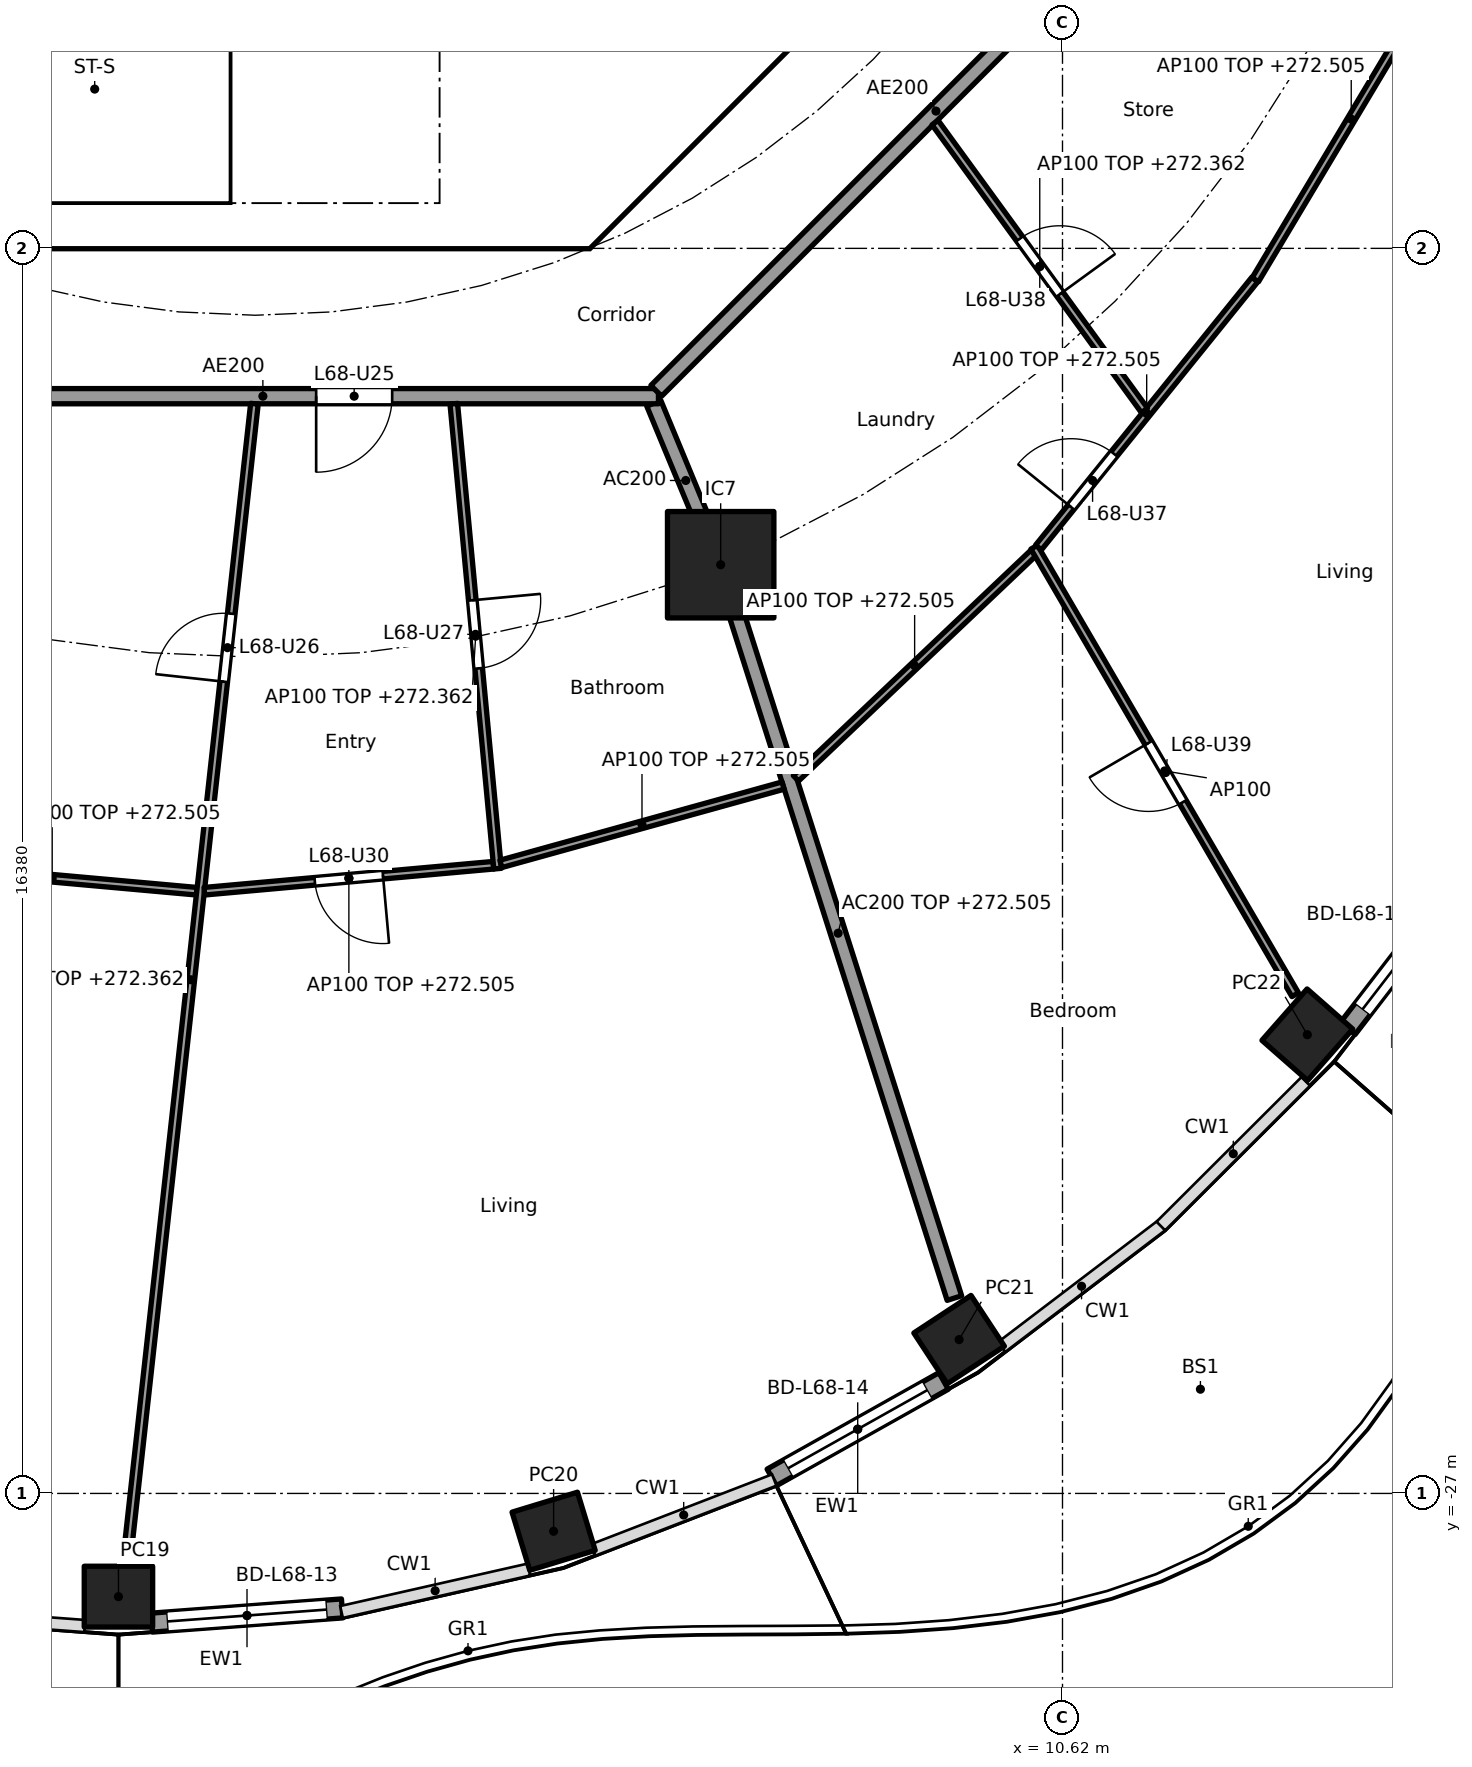
"""IFC4 building model, lengths in metres.
Left out: names, types, materials, properties, quantities, classifications, styles, units other than length and angle.
Written with IfcOpenShell. Run it as: python <this file> out.ifc"""

import sys

from ifc_helpers import new_model, si_unit, direction, frame, frame_2d, origin, origin_2d, place, context, subcontext, project, spatial, polyline, rectangle, hollow_rectangle, outline, extrude, element, fill, save


model = new_model("IFC4")
c1 = context("Model", 3, precision=1e-05, world=origin(), true_north=direction((0.0, 1.0)))
c2 = subcontext(c1, "Body", "Model", "MODEL_VIEW")
j1 = project(units=[si_unit("LENGTHUNIT", "METRE"), si_unit("PLANEANGLEUNIT", "RADIAN")], contexts=[c1])
p1 = place(None, origin())
s1 = spatial("IfcSite", under=j1, at=p1, CompositionType="ELEMENT")
p2 = place(p1, origin())
s2 = spatial("IfcBuilding", under=s1, at=p2, CompositionType="ELEMENT")
p3 = place(p2, frame((0.0, 0.0, 269.6)))
s3 = spatial("IfcBuildingStorey", under=s2, at=p3, CompositionType="ELEMENT", Elevation=269.6)
for number, where, z_axis, x_axis in (
    (1, (-1.8, -28.358, 0.0), (0.0, 0.0, 1.0), (1.0, 0.0, 0.0)),
    (2, (3.925, -27.498, 0.0), (0.0, 0.0, 1.0), (0.957, 0.292, 0.0)),
    (3, (9.26, -24.976, 0.0), (0.0, 0.0, 1.0), (0.836, 0.549, 0.0)),
    (4, (13.841, -20.965, 0.0), (0.0, 0.0, 1.0), (0.66, 0.751, 0.0)),
):
    element("IfcColumn", number, at=place(p3, frame(where, z_axis=z_axis, x_axis=x_axis)), inside=s3, PredefinedType="COLUMN", context=c2, shape_type="SweptSolid", body=[
        extrude(hollow_rectangle(XDim=0.9, YDim=0.8, WallThickness=0.028, at=origin_2d()), origin(), (0.0, 0.0, 1.0), 3.7),
    ])
p4 = place(p3, frame((6.123, -14.782, 0.0), z_axis=(0.0, 0.0, 1.0), x_axis=(1.0, 0.0, 0.0)))
e5 = element("IfcColumn", 5, at=p4, inside=s3, PredefinedType="COLUMN", context=c2, shape_type="SweptSolid", body=[
    extrude(rectangle(XDim=1.4, YDim=1.4, at=origin_2d()), origin(), (0.0, 0.0, 1.0), 3.7),
])
p5 = place(p3, frame((1.143, -28.513, 0.0), z_axis=(0.0, 0.0, 1.0), x_axis=(-0.997236892469, -0.074287147606, 0.0)))
e6 = element("IfcWall", 6, at=p5, inside=s3, PredefinedType="SOLIDWALL", context=c2, shape_type="SweptSolid", body=[
    extrude(rectangle(XDim=2.511, YDim=0.25, at=frame_2d((1.255, 0.0))), origin(), (0.0, 0.0, 1.0), 3.44),
])
p6 = place(p5, frame((0.205, 0.0, 0.0)))
e7 = element("IfcOpeningElement", 7, at=p6, cuts=e6, PredefinedType="OPENING", context=c2, shape_type="SweptSolid", body=[
    extrude(rectangle(XDim=2.1, YDim=2.4, at=frame_2d((1.05, 1.2))), frame((0.0, 0.135, 0.0), z_axis=(0.0, -1.0, 0.0), x_axis=(1.0, 0.0, 0.0)), (0.0, 0.0, 1.0), 0.27),
])
p7 = place(p3, frame((9.056, -25.521, 0.0), z_axis=(0.0, 0.0, 1.0), x_axis=(-0.872093060299, -0.489340059855, 0.0)))
e8 = element("IfcWall", 8, at=p7, inside=s3, PredefinedType="SOLIDWALL", context=c2, shape_type="SweptSolid", body=[
    extrude(rectangle(XDim=2.593, YDim=0.25, at=frame_2d((1.296, 0.0))), origin(), (0.0, 0.0, 1.0), 3.44),
])
p8 = place(p7, frame((0.247, 0.0, 0.0)))
e9 = element("IfcOpeningElement", 9, at=p8, cuts=e8, PredefinedType="OPENING", context=c2, shape_type="SweptSolid", body=[
    extrude(rectangle(XDim=2.1, YDim=2.4, at=frame_2d((1.05, 1.2))), frame((0.0, 0.135, 0.0), z_axis=(0.0, -1.0, 0.0), x_axis=(1.0, 0.0, 0.0)), (0.0, 0.0, 1.0), 0.27),
])
p9 = place(p3, frame((16.047, -18.711, 0.0), z_axis=(0.0, 0.0, 1.0), x_axis=(-0.610432336622, -0.792068407656, 0.0)))
e10 = element("IfcWall", 10, at=p9, inside=s3, PredefinedType="SOLIDWALL", context=c2, shape_type="SweptSolid", body=[
    extrude(rectangle(XDim=2.746, YDim=0.25, at=frame_2d((1.373, 0.0))), origin(), (0.0, 0.0, 1.0), 3.44),
])
p10 = place(p9, frame((0.323, 0.0, 0.0)))
e11 = element("IfcOpeningElement", 11, at=p10, cuts=e10, PredefinedType="OPENING", context=c2, shape_type="SweptSolid", body=[
    extrude(rectangle(XDim=2.1, YDim=2.4, at=frame_2d((1.05, 1.2))), frame((0.0, 0.135, 0.0), z_axis=(0.0, -1.0, 0.0), x_axis=(1.0, 0.0, 0.0)), (0.0, 0.0, 1.0), 0.27),
])
p11 = place(p3, frame((4.613, -9.988, 0.0), z_axis=(0.0, 0.0, 1.0), x_axis=(0.707106781187, 0.707106781187, 0.0)))
e12 = element("IfcWall", 12, at=p11, inside=s3, PredefinedType="SHEAR", context=c2, shape_type="SweptSolid", body=[
    extrude(rectangle(XDim=7.602, YDim=0.6, at=frame_2d((3.801, 0.0))), origin(), (0.0, 0.0, 1.0), 3.44),
])
p12 = place(p11, frame((3.201, 0.0, 0.0)))
e13 = element("IfcOpeningElement", 13, at=p12, cuts=e12, PredefinedType="OPENING", context=c2, shape_type="SweptSolid", body=[
    extrude(rectangle(XDim=1.2, YDim=2.1, at=frame_2d((0.6, 1.05))), frame((0.0, 0.31, 0.0), z_axis=(0.0, -1.0, 0.0), x_axis=(1.0, 0.0, 0.0)), (0.0, 0.0, 1.0), 0.62),
])
p13 = place(p3, frame((4.0, -10.025, 0.0), z_axis=(0.0, 0.0, 1.0), x_axis=(0.0, 1.0, 0.0)))
e14 = element("IfcWall", 14, at=p13, inside=s3, PredefinedType="SOLIDWALL", context=c2, shape_type="SweptSolid", body=[
    extrude(rectangle(XDim=3.0, YDim=0.2, at=frame_2d((1.5, 0.0))), origin(), (0.0, 0.0, 1.0), 3.44),
])
p14 = place(p13, frame((0.975, 0.0, 0.0)))
e15 = element("IfcOpeningElement", 15, at=p14, cuts=e14, PredefinedType="OPENING", context=c2, shape_type="SweptSolid", body=[
    extrude(rectangle(XDim=1.1, YDim=2.1, at=frame_2d((0.55, 1.05))), frame((0.0, 0.11, 0.0), z_axis=(0.0, -1.0, 0.0), x_axis=(1.0, 0.0, 0.0)), (0.0, 0.0, 1.0), 0.22),
])
p15 = place(p3, origin())
e16 = element("IfcWall", 16, at=p15, inside=s3, PredefinedType="SHEAR", context=c2, shape_type="SweptSolid", body=[
    extrude(outline(polyline([(-4.152, -10.025), (4.152, -10.025), (4.401, -9.776), (4.825, -10.2), (4.401, -10.625), (-4.401, -10.625), (-4.825, -10.2), (-4.401, -9.776), (-4.152, -10.025)])), origin(), (0.0, 0.0, 1.0), 3.44),
])
p16 = place(p3, frame((5.243, -12.657, 0.0), z_axis=(0.0, 0.0, 1.0), x_axis=(0.382707856524, -0.923869415315, 0.0)))
e17 = element("IfcWall", 17, at=p16, inside=s3, PredefinedType="PARTITIONING", context=c2, shape_type="SweptSolid", body=[
    extrude(rectangle(XDim=2.2, YDim=0.2, at=frame_2d((1.1, 0.0))), origin(), (0.0, 0.0, 1.0), 3.44),
])
p17 = place(p3, frame((6.138, -14.83, 0.0), z_axis=(0.0, 0.0, 1.0), x_axis=(0.303653679037, -0.952782474234, 0.0)))
e18 = element("IfcWall", 18, at=p17, inside=s3, PredefinedType="PARTITIONING", context=c2, shape_type="SweptSolid", body=[
    extrude(rectangle(XDim=10.076, YDim=0.2, at=frame_2d((5.038, 0.0))), origin(), (0.0, 0.0, 1.0), 2.905),
])
p18 = place(p3, frame((-5.104, -12.565, 0.0), z_axis=(0.0, 0.0, 1.0), x_axis=(1.0, 0.0, 0.0)))
e19 = element("IfcWall", 19, at=p18, inside=s3, PredefinedType="PARTITIONING", context=c2, shape_type="SweptSolid", body=[
    extrude(rectangle(XDim=10.409, YDim=0.2, at=frame_2d((5.205, 0.0))), origin(), (0.0, 0.0, 1.0), 3.44),
])
p19 = place(p18, frame((5.906, 0.0, 0.0)))
e20 = element("IfcOpeningElement", 20, at=p19, cuts=e19, PredefinedType="OPENING", context=c2, shape_type="SweptSolid", body=[
    extrude(rectangle(XDim=1.0, YDim=2.1, at=frame_2d((0.5, 1.05))), frame((0.0, 0.11, 0.0), z_axis=(0.0, -1.0, 0.0), x_axis=(1.0, 0.0, 0.0)), (0.0, 0.0, 1.0), 0.22),
])
p20 = place(p3, frame((5.275, -12.494, 0.0), z_axis=(0.0, 0.0, 1.0), x_axis=(0.707106781187, 0.707106781187, 0.0)))
e21 = element("IfcWall", 21, at=p20, inside=s3, PredefinedType="PARTITIONING", context=c2, shape_type="SweptSolid", body=[
    extrude(rectangle(XDim=10.409, YDim=0.2, at=frame_2d((5.205, 0.0))), origin(), (0.0, 0.0, 1.0), 3.44),
])
p21 = place(p3, frame((-4.573, -18.736, 0.0), z_axis=(0.0, 0.0, 1.0), x_axis=(0.995986472869, -0.089503887414, 0.0)))
e22 = element("IfcWall", 22, at=p21, inside=s3, PredefinedType="PARTITIONING", context=c2, shape_type="SweptSolid", body=[
    extrude(rectangle(XDim=3.819, YDim=0.1, at=frame_2d((1.909, 0.0))), origin(), (0.0, 0.0, 1.0), 2.905),
])
p22 = place(p3, frame((-0.011, -12.664, 0.0), z_axis=(0.0, 0.0, 1.0), x_axis=(-0.109805889692, -0.993953050495, 0.0)))
e23 = element("IfcWall", 23, at=p22, inside=s3, PredefinedType="PARTITIONING", context=c2, shape_type="SweptSolid", body=[
    extrude(rectangle(XDim=15.248, YDim=0.1, at=frame_2d((7.624, 0.0))), origin(), (0.0, 0.0, 1.0), 2.762),
])
p23 = place(p22, frame((2.778, 0.0, 0.0)))
e24 = element("IfcOpeningElement", 24, at=p23, cuts=e23, PredefinedType="OPENING", context=c2, shape_type="SweptSolid", body=[
    extrude(rectangle(XDim=0.9, YDim=2.1, at=frame_2d((0.45, 1.05))), frame((0.0, 0.06, 0.0), z_axis=(0.0, -1.0, 0.0), x_axis=(1.0, 0.0, 0.0)), (0.0, 0.0, 1.0), 0.12),
])
p24 = place(p3, frame((-0.67, -19.077, 0.0), z_axis=(0.0, 0.0, 1.0), x_axis=(0.995986472869, 0.089503887414, 0.0)))
e25 = element("IfcWall", 25, at=p24, inside=s3, PredefinedType="PARTITIONING", context=c2, shape_type="SweptSolid", body=[
    extrude(rectangle(XDim=3.819, YDim=0.1, at=frame_2d((1.909, 0.0))), origin(), (0.0, 0.0, 1.0), 2.905),
])
p25 = place(p24, frame((1.459, 0.0, 0.0)))
e26 = element("IfcOpeningElement", 26, at=p25, cuts=e25, PredefinedType="OPENING", context=c2, shape_type="SweptSolid", body=[
    extrude(rectangle(XDim=0.9, YDim=2.1, at=frame_2d((0.45, 1.05))), frame((0.0, 0.06, 0.0), z_axis=(0.0, -1.0, 0.0), x_axis=(1.0, 0.0, 0.0)), (0.0, 0.0, 1.0), 0.12),
])
p26 = place(p3, frame((2.612, -12.664, 0.0), z_axis=(0.0, 0.0, 1.0), x_axis=(0.093781393779, -0.995592813444, 0.0)))
e27 = element("IfcWall", 27, at=p26, inside=s3, PredefinedType="PARTITIONING", context=c2, shape_type="SweptSolid", body=[
    extrude(rectangle(XDim=6.144, YDim=0.1, at=frame_2d((3.072, 0.0))), origin(), (0.0, 0.0, 1.0), 2.762),
])
p27 = place(p26, frame((2.597, 0.0, 0.0)))
e28 = element("IfcOpeningElement", 28, at=p27, cuts=e27, PredefinedType="OPENING", context=c2, shape_type="SweptSolid", body=[
    extrude(rectangle(XDim=0.9, YDim=2.1, at=frame_2d((0.45, 1.05))), frame((0.0, 0.06, 0.0), z_axis=(0.0, -1.0, 0.0), x_axis=(1.0, 0.0, 0.0)), (0.0, 0.0, 1.0), 0.12),
])
p28 = place(p3, frame((3.231, -18.718, 0.0), z_axis=(0.0, 0.0, 1.0), x_axis=(0.963606817151, 0.267323590318, 0.0)))
e29 = element("IfcWall", 29, at=p28, inside=s3, PredefinedType="PARTITIONING", context=c2, shape_type="SweptSolid", body=[
    extrude(rectangle(XDim=3.853, YDim=0.1, at=frame_2d((1.927, 0.0))), origin(), (0.0, 0.0, 1.0), 2.905),
])
p29 = place(p3, frame((7.113, -17.592, 0.0), z_axis=(0.0, 0.0, 1.0), x_axis=(0.725433932329, 0.688291805723, 0.0)))
e30 = element("IfcWall", 30, at=p29, inside=s3, PredefinedType="PARTITIONING", context=c2, shape_type="SweptSolid", body=[
    extrude(rectangle(XDim=4.305, YDim=0.1, at=frame_2d((2.153, 0.0))), origin(), (0.0, 0.0, 1.0), 2.905),
])
p30 = place(p3, frame((10.248, -14.551, 0.0), z_axis=(0.0, 0.0, 1.0), x_axis=(0.503826483408, -0.86380488226, 0.0)))
e31 = element("IfcWall", 31, at=p30, inside=s3, PredefinedType="PARTITIONING", context=c2, shape_type="SweptSolid", body=[
    extrude(rectangle(XDim=6.816, YDim=0.1, at=frame_2d((3.408, 0.0))), origin(), (0.0, 0.0, 1.0), 3.44),
])
p31 = place(p30, frame((2.983, 0.0, 0.0)))
e32 = element("IfcOpeningElement", 32, at=p31, cuts=e31, PredefinedType="OPENING", context=c2, shape_type="SweptSolid", body=[
    extrude(rectangle(XDim=0.9, YDim=2.1, at=frame_2d((0.45, 1.05))), frame((0.0, 0.06, 0.0), z_axis=(0.0, -1.0, 0.0), x_axis=(1.0, 0.0, 0.0)), (0.0, 0.0, 1.0), 0.12),
])
p32 = place(p3, frame((10.304, -14.555, 0.0), z_axis=(0.0, 0.0, 1.0), x_axis=(0.628170338674, 0.778075848237, 0.0)))
e33 = element("IfcWall", 33, at=p32, inside=s3, PredefinedType="PARTITIONING", context=c2, shape_type="SweptSolid", body=[
    extrude(rectangle(XDim=4.532, YDim=0.1, at=frame_2d((2.266, 0.0))), origin(), (0.0, 0.0, 1.0), 2.905),
])
p33 = place(p32, frame((0.683, 0.0, 0.0)))
e34 = element("IfcOpeningElement", 34, at=p33, cuts=e33, PredefinedType="OPENING", context=c2, shape_type="SweptSolid", body=[
    extrude(rectangle(XDim=0.9, YDim=2.1, at=frame_2d((0.45, 1.05))), frame((0.0, 0.06, 0.0), z_axis=(0.0, -1.0, 0.0), x_axis=(1.0, 0.0, 0.0)), (0.0, 0.0, 1.0), 0.12),
])
p34 = place(p3, frame((8.943, -8.966, 0.0), z_axis=(0.0, 0.0, 1.0), x_axis=(0.588357698232, -0.808600778463, 0.0)))
e35 = element("IfcWall", 35, at=p34, inside=s3, PredefinedType="PARTITIONING", context=c2, shape_type="SweptSolid", body=[
    extrude(rectangle(XDim=4.682, YDim=0.1, at=frame_2d((2.341, 0.0))), origin(), (0.0, 0.0, 1.0), 2.762),
])
p35 = place(p34, frame((1.891, 0.0, 0.0)))
e36 = element("IfcOpeningElement", 36, at=p35, cuts=e35, PredefinedType="OPENING", context=c2, shape_type="SweptSolid", body=[
    extrude(rectangle(XDim=0.9, YDim=2.1, at=frame_2d((0.45, 1.05))), frame((0.0, 0.06, 0.0), z_axis=(0.0, -1.0, 0.0), x_axis=(1.0, 0.0, 0.0)), (0.0, 0.0, 1.0), 0.12),
])
p36 = place(p3, frame((13.157, -11.033, 0.0), z_axis=(0.0, 0.0, 1.0), x_axis=(0.512736548388, 0.858545998737, 0.0)))
e37 = element("IfcWall", 37, at=p36, inside=s3, PredefinedType="PARTITIONING", context=c2, shape_type="SweptSolid", body=[
    extrude(rectangle(XDim=4.922, YDim=0.1, at=frame_2d((2.461, 0.0))), origin(), (0.0, 0.0, 1.0), 2.905),
])
p37 = place(p3, frame((14.823, -6.151, 0.0), z_axis=(0.0, 0.0, 1.0), x_axis=(0.821435065081, -0.570302054928, 0.0)))
e38 = element("IfcWall", 38, at=p37, inside=s3, PredefinedType="PARTITIONING", context=c2, shape_type="SweptSolid", body=[
    extrude(rectangle(XDim=5.368, YDim=0.1, at=frame_2d((2.684, 0.0))), origin(), (0.0, 0.0, 1.0), 3.44),
])
p38 = place(p37, frame((2.771, 0.0, 0.0)))
e39 = element("IfcOpeningElement", 39, at=p38, cuts=e38, PredefinedType="OPENING", context=c2, shape_type="SweptSolid", body=[
    extrude(rectangle(XDim=0.9, YDim=2.1, at=frame_2d((0.45, 1.05))), frame((0.0, 0.06, 0.0), z_axis=(0.0, -1.0, 0.0), x_axis=(1.0, 0.0, 0.0)), (0.0, 0.0, 1.0), 0.12),
])
p39 = place(p6, origin())
e40 = element("IfcDoor", 40, at=p39, inside=s3, OperationType="SLIDING_TO_LEFT", PredefinedType="DOOR", context=c2, shape_type="SweptSolid", body=[
    extrude(rectangle(XDim=2.1, YDim=2.4, at=frame_2d((1.05, 1.2))), frame((0.0, 0.025, 0.0), z_axis=(0.0, -1.0, 0.0), x_axis=(1.0, 0.0, 0.0)), (0.0, 0.0, 1.0), 0.05),
])
fill(e7, e40)
p40 = place(p8, origin())
e41 = element("IfcDoor", 41, at=p40, inside=s3, OperationType="SLIDING_TO_LEFT", PredefinedType="DOOR", context=c2, shape_type="SweptSolid", body=[
    extrude(rectangle(XDim=2.1, YDim=2.4, at=frame_2d((1.05, 1.2))), frame((0.0, 0.025, 0.0), z_axis=(0.0, -1.0, 0.0), x_axis=(1.0, 0.0, 0.0)), (0.0, 0.0, 1.0), 0.05),
])
fill(e9, e41)
p41 = place(p10, origin())
e42 = element("IfcDoor", 42, at=p41, inside=s3, OperationType="SLIDING_TO_LEFT", PredefinedType="DOOR", context=c2, shape_type="SweptSolid", body=[
    extrude(rectangle(XDim=2.1, YDim=2.4, at=frame_2d((1.05, 1.2))), frame((0.0, 0.025, 0.0), z_axis=(0.0, -1.0, 0.0), x_axis=(1.0, 0.0, 0.0)), (0.0, 0.0, 1.0), 0.05),
])
fill(e11, e42)
p42 = place(p14, origin())
e43 = element("IfcDoor", 43, at=p42, inside=s3, OperationType="SINGLE_SWING_LEFT", PredefinedType="DOOR", context=c2, shape_type="SweptSolid", body=[
    extrude(rectangle(XDim=1.1, YDim=2.1, at=frame_2d((0.55, 1.05))), frame((0.0, 0.025, 0.0), z_axis=(0.0, -1.0, 0.0), x_axis=(1.0, 0.0, 0.0)), (0.0, 0.0, 1.0), 0.05),
])
fill(e15, e43)
p43 = place(p19, frame((1.0, 0.0, 0.0), x_axis=(-1.0, 0.0, 0.0)))
e44 = element("IfcDoor", 44, at=p43, inside=s3, OperationType="SINGLE_SWING_RIGHT", PredefinedType="DOOR", context=c2, shape_type="SweptSolid", body=[
    extrude(rectangle(XDim=1.0, YDim=2.1, at=frame_2d((0.5, 1.05))), frame((0.0, 0.025, 0.0), z_axis=(0.0, -1.0, 0.0), x_axis=(1.0, 0.0, 0.0)), (0.0, 0.0, 1.0), 0.05),
])
fill(e20, e44)
p44 = place(p23, frame((0.9, 0.0, 0.0), x_axis=(-1.0, 0.0, 0.0)))
e45 = element("IfcDoor", 45, at=p44, inside=s3, OperationType="SINGLE_SWING_LEFT", PredefinedType="DOOR", context=c2, shape_type="SweptSolid", body=[
    extrude(rectangle(XDim=0.9, YDim=2.1, at=frame_2d((0.45, 1.05))), frame((0.0, 0.025, 0.0), z_axis=(0.0, -1.0, 0.0), x_axis=(1.0, 0.0, 0.0)), (0.0, 0.0, 1.0), 0.05),
])
fill(e24, e45)
p45 = place(p27, origin())
e46 = element("IfcDoor", 46, at=p45, inside=s3, OperationType="SINGLE_SWING_LEFT", PredefinedType="DOOR", context=c2, shape_type="SweptSolid", body=[
    extrude(rectangle(XDim=0.9, YDim=2.1, at=frame_2d((0.45, 1.05))), frame((0.0, 0.025, 0.0), z_axis=(0.0, -1.0, 0.0), x_axis=(1.0, 0.0, 0.0)), (0.0, 0.0, 1.0), 0.05),
])
fill(e28, e46)
p46 = place(p25, frame((0.9, 0.0, 0.0), x_axis=(-1.0, 0.0, 0.0)))
e47 = element("IfcDoor", 47, at=p46, inside=s3, OperationType="SINGLE_SWING_LEFT", PredefinedType="DOOR", context=c2, shape_type="SweptSolid", body=[
    extrude(rectangle(XDim=0.9, YDim=2.1, at=frame_2d((0.45, 1.05))), frame((0.0, 0.025, 0.0), z_axis=(0.0, -1.0, 0.0), x_axis=(1.0, 0.0, 0.0)), (0.0, 0.0, 1.0), 0.05),
])
fill(e26, e47)
p47 = place(p33, origin())
e48 = element("IfcDoor", 48, at=p47, inside=s3, OperationType="SINGLE_SWING_LEFT", PredefinedType="DOOR", context=c2, shape_type="SweptSolid", body=[
    extrude(rectangle(XDim=0.9, YDim=2.1, at=frame_2d((0.45, 1.05))), frame((0.0, 0.025, 0.0), z_axis=(0.0, -1.0, 0.0), x_axis=(1.0, 0.0, 0.0)), (0.0, 0.0, 1.0), 0.05),
])
fill(e34, e48)
p48 = place(p35, origin())
e49 = element("IfcDoor", 49, at=p48, inside=s3, OperationType="SINGLE_SWING_RIGHT", PredefinedType="DOOR", context=c2, shape_type="SweptSolid", body=[
    extrude(rectangle(XDim=0.9, YDim=2.1, at=frame_2d((0.45, 1.05))), frame((0.0, 0.025, 0.0), z_axis=(0.0, -1.0, 0.0), x_axis=(1.0, 0.0, 0.0)), (0.0, 0.0, 1.0), 0.05),
])
fill(e36, e49)
p49 = place(p31, frame((0.9, 0.0, 0.0), x_axis=(-1.0, 0.0, 0.0)))
e50 = element("IfcDoor", 50, at=p49, inside=s3, OperationType="SINGLE_SWING_RIGHT", PredefinedType="DOOR", context=c2, shape_type="SweptSolid", body=[
    extrude(rectangle(XDim=0.9, YDim=2.1, at=frame_2d((0.45, 1.05))), frame((0.0, 0.025, 0.0), z_axis=(0.0, -1.0, 0.0), x_axis=(1.0, 0.0, 0.0)), (0.0, 0.0, 1.0), 0.05),
])
fill(e32, e50)
save(model, sys.argv[1])
